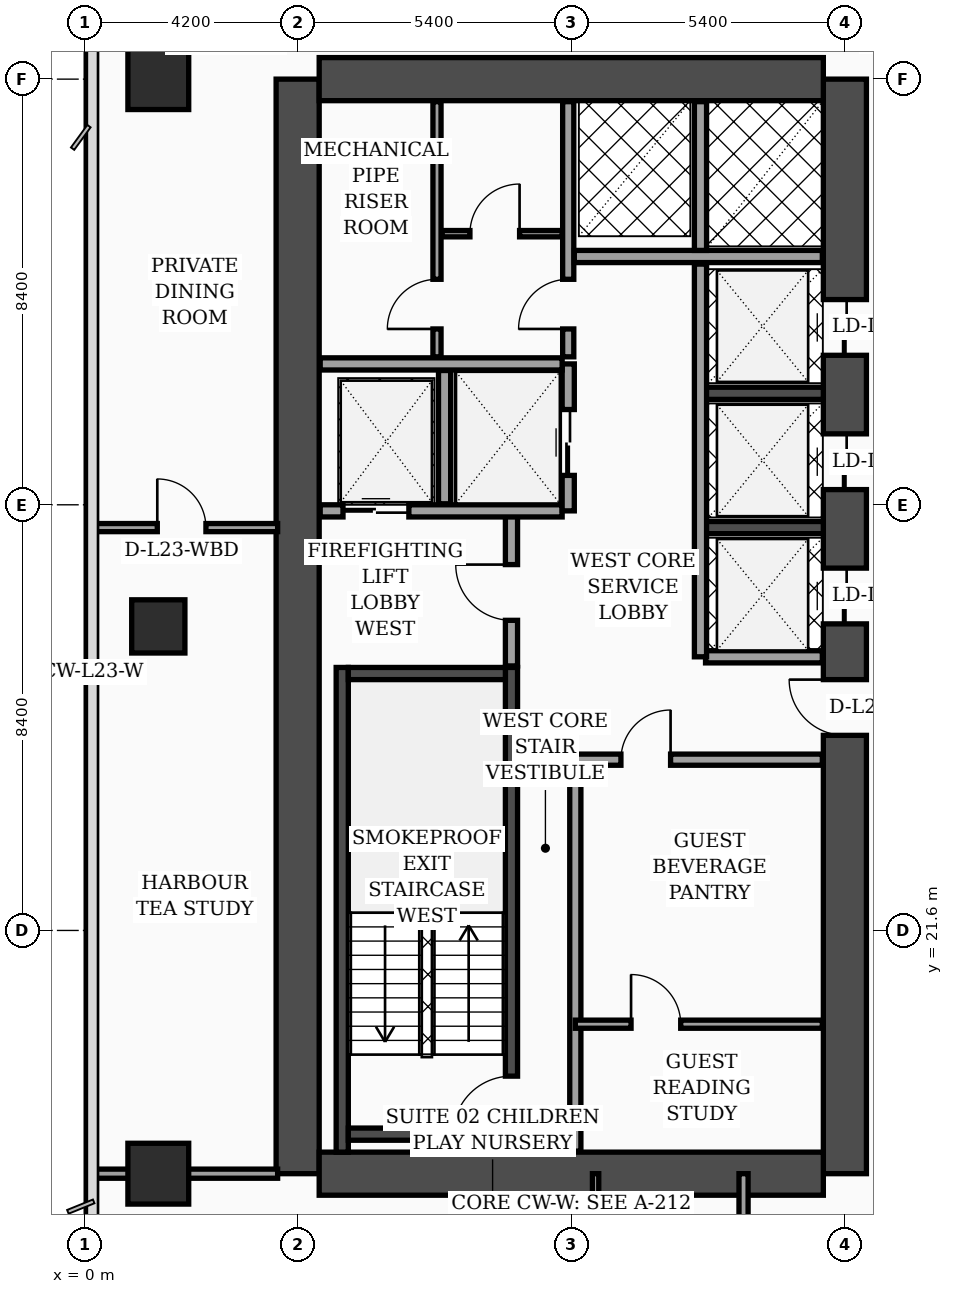
"""IFC4 building model, lengths in metres.
Left out: names, types, materials, properties, quantities, classifications, styles, units other than length and angle.
Written with IfcOpenShell. Run it as: python <this file> out.ifc"""

import sys

from ifc_helpers import new_model, si_unit, direction, frame, frame_2d, origin, origin_2d, place, context, subcontext, project, spatial, rectangle, extrude, element, fill, save


model = new_model("IFC4")
c1 = context("Model", 3, precision=1e-05, world=origin(), true_north=direction((0.0, 1.0)))
c2 = subcontext(c1, "Body", "Model", "MODEL_VIEW")
j1 = project(units=[si_unit("LENGTHUNIT", "METRE"), si_unit("PLANEANGLEUNIT", "RADIAN")], contexts=[c1])
p1 = place(None, origin())
s1 = spatial("IfcSite", under=j1, at=p1, CompositionType="ELEMENT")
p2 = place(p1, origin())
s2 = spatial("IfcBuilding", under=s1, at=p2, CompositionType="ELEMENT")
p3 = place(p2, frame((0.0, 0.0, 97.4)))
s3 = spatial("IfcBuildingStorey", under=s2, at=p3, CompositionType="ELEMENT", Elevation=97.4)
p4 = place(p3, frame((4.2, 16.8, 0.0), z_axis=(0.0, 0.0, 1.0), x_axis=(0.0, 1.0, 0.0)))
e1 = element("IfcWall", 1, at=p4, inside=s3, PredefinedType="SHEAR", context=c2, shape_type="SweptSolid", body=[
    extrude(rectangle(XDim=21.6, YDim=0.85, at=frame_2d((10.8, 0.0))), origin(), (0.0, 0.0, 1.0), 3.56),
])
p5 = place(p3, frame((15.0, 16.8, 0.0), z_axis=(0.0, 0.0, 1.0), x_axis=(0.0, 1.0, 0.0)))
e2 = element("IfcWall", 2, at=p5, inside=s3, PredefinedType="SHEAR", context=c2, shape_type="SweptSolid", body=[
    extrude(rectangle(XDim=21.6, YDim=0.85, at=frame_2d((10.8, 0.0))), origin(), (0.0, 0.0, 1.0), 3.56),
])
p6 = place(p5, frame((8.65, 0.0, 0.0)))
e3 = element("IfcOpeningElement", 3, at=p6, cuts=e2, PredefinedType="OPENING", context=c2, shape_type="SweptSolid", body=[
    extrude(rectangle(XDim=1.1, YDim=2.2, at=frame_2d((0.55, 1.1))), frame((0.0, 0.435, 0.0), z_axis=(0.0, -1.0, 0.0), x_axis=(1.0, 0.0, 0.0)), (0.0, 0.0, 1.0), 0.87),
])
p7 = place(p5, frame((10.85, 0.0, 0.0)))
e4 = element("IfcOpeningElement", 4, at=p7, cuts=e2, PredefinedType="OPENING", context=c2, shape_type="SweptSolid", body=[
    extrude(rectangle(XDim=1.1, YDim=2.2, at=frame_2d((0.55, 1.1))), frame((0.0, 0.435, 0.0), z_axis=(0.0, -1.0, 0.0), x_axis=(1.0, 0.0, 0.0)), (0.0, 0.0, 1.0), 0.87),
])
p8 = place(p5, frame((13.5, 0.0, 0.0)))
e5 = element("IfcOpeningElement", 5, at=p8, cuts=e2, PredefinedType="OPENING", context=c2, shape_type="SweptSolid", body=[
    extrude(rectangle(XDim=1.1, YDim=2.2, at=frame_2d((0.55, 1.1))), frame((0.0, 0.435, 0.0), z_axis=(0.0, -1.0, 0.0), x_axis=(1.0, 0.0, 0.0)), (0.0, 0.0, 1.0), 0.87),
])
p9 = place(p5, frame((16.15, 0.0, 0.0)))
e6 = element("IfcOpeningElement", 6, at=p9, cuts=e2, PredefinedType="OPENING", context=c2, shape_type="SweptSolid", body=[
    extrude(rectangle(XDim=1.1, YDim=2.2, at=frame_2d((0.55, 1.1))), frame((0.0, 0.435, 0.0), z_axis=(0.0, -1.0, 0.0), x_axis=(1.0, 0.0, 0.0)), (0.0, 0.0, 1.0), 0.87),
])
for number, where, z_axis, x_axis in (
    (7, (4.625, 38.4, 0.0), (0.0, 0.0, 1.0), (1.0, 0.0, 0.0)),
    (8, (4.625, 16.8, 0.0), (0.0, 0.0, 1.0), (1.0, 0.0, 0.0)),
):
    element("IfcWall", number, at=place(p3, frame(where, z_axis=z_axis, x_axis=x_axis)), inside=s3, PredefinedType="SHEAR", context=c2, shape_type="SweptSolid", body=[
        extrude(rectangle(XDim=9.95, YDim=0.85, at=frame_2d((4.975, 0.0))), origin(), (0.0, 0.0, 1.0), 3.56),
    ])
p10 = place(p3, frame((5.08, 17.225, 0.0), z_axis=(0.0, 0.0, 1.0), x_axis=(0.0, 1.0, 0.0)))
e9 = element("IfcWall", 9, at=p10, inside=s3, PredefinedType="SOLIDWALL", context=c2, shape_type="SweptSolid", body=[
    extrude(rectangle(XDim=9.565, YDim=0.24, at=frame_2d((4.782, 0.0))), origin(), (0.0, 0.0, 1.0), 3.56),
])
p11 = place(p3, frame((8.42, 17.225, 0.0), z_axis=(0.0, 0.0, 1.0), x_axis=(0.0, 1.0, 0.0)))
e10 = element("IfcWall", 10, at=p11, inside=s3, PredefinedType="SOLIDWALL", context=c2, shape_type="SweptSolid", body=[
    extrude(rectangle(XDim=9.565, YDim=0.24, at=frame_2d((4.782, 0.0))), origin(), (0.0, 0.0, 1.0), 3.56),
])
p12 = place(p11, frame((0.35, 0.0, 0.0)))
e11 = element("IfcOpeningElement", 11, at=p12, cuts=e10, PredefinedType="OPENING", context=c2, shape_type="SweptSolid", body=[
    extrude(rectangle(XDim=1.15, YDim=2.2, at=frame_2d((0.575, 1.1))), frame((0.0, 0.13, 0.0), z_axis=(0.0, -1.0, 0.0), x_axis=(1.0, 0.0, 0.0)), (0.0, 0.0, 1.0), 0.26),
])
for number, where, z_axis, x_axis in (
    (12, (5.2, 17.58, 0.0), (0.0, 0.0, 1.0), (1.0, 0.0, 0.0)),
    (13, (5.2, 26.67, 0.0), (0.0, 0.0, 1.0), (1.0, 0.0, 0.0)),
):
    element("IfcWall", number, at=place(p3, frame(where, z_axis=z_axis, x_axis=x_axis)), inside=s3, PredefinedType="SOLIDWALL", context=c2, shape_type="SweptSolid", body=[
        extrude(rectangle(XDim=3.1, YDim=0.24, at=frame_2d((1.55, 0.0))), origin(), (0.0, 0.0, 1.0), 3.56),
    ])
for number, where, z_axis, x_axis in (
    (14, (12.18, 29.55, 0.0), (0.0, 0.0, 1.0), (1.0, 0.0, 0.0)),
    (15, (12.18, 32.2, 0.0), (0.0, 0.0, 1.0), (1.0, 0.0, 0.0)),
):
    element("IfcWall", number, at=place(p3, frame(where, z_axis=z_axis, x_axis=x_axis)), inside=s3, PredefinedType="SOLIDWALL", context=c2, shape_type="SweptSolid", body=[
        extrude(rectangle(XDim=2.395, YDim=0.24, at=frame_2d((1.198, 0.0))), origin(), (0.0, 0.0, 1.0), 3.56),
    ])
p13 = place(p3, frame((1.45, 16.8, 0.0), z_axis=(0.0, 0.0, 1.0), x_axis=(1.0, 0.0, 0.0)))
e16 = element("IfcColumn", 16, at=p13, inside=s3, PredefinedType="COLUMN", context=c2, shape_type="SweptSolid", body=[
    extrude(rectangle(XDim=1.2, YDim=1.2, at=origin_2d()), origin(), (0.0, 0.0, 1.0), 3.56),
])
p14 = place(p3, frame((1.45, 27.6, 0.0), z_axis=(0.0, 0.0, 1.0), x_axis=(1.0, 0.0, 0.0)))
e17 = element("IfcColumn", 17, at=p14, inside=s3, PredefinedType="COLUMN", context=c2, shape_type="SweptSolid", body=[
    extrude(rectangle(XDim=1.05, YDim=1.05, at=origin_2d()), origin(), (0.0, 0.0, 1.0), 3.56),
])
p15 = place(p3, frame((1.45, 38.4, 0.0), z_axis=(0.0, 0.0, 1.0), x_axis=(1.0, 0.0, 0.0)))
e18 = element("IfcColumn", 18, at=p15, inside=s3, PredefinedType="COLUMN", context=c2, shape_type="SweptSolid", body=[
    extrude(rectangle(XDim=1.2, YDim=1.2, at=origin_2d()), origin(), (0.0, 0.0, 1.0), 3.56),
])
p16 = place(p3, frame((8.42, 26.82, 0.0), z_axis=(0.0, 0.0, 1.0), x_axis=(0.0, 1.0, 0.0)))
e19 = element("IfcWall", 19, at=p16, inside=s3, PredefinedType="SOLIDWALL", context=c2, shape_type="SweptSolid", body=[
    extrude(rectangle(XDim=3.0, YDim=0.24, at=frame_2d((1.5, 0.0))), origin(), (0.0, 0.0, 1.0), 3.56),
])
p17 = place(p16, frame((0.9, 0.0, 0.0)))
e20 = element("IfcOpeningElement", 20, at=p17, cuts=e19, PredefinedType="OPENING", context=c2, shape_type="SweptSolid", body=[
    extrude(rectangle(XDim=1.1, YDim=2.2, at=frame_2d((0.55, 1.1))), frame((0.0, 0.13, 0.0), z_axis=(0.0, -1.0, 0.0), x_axis=(1.0, 0.0, 0.0)), (0.0, 0.0, 1.0), 0.26),
])
p18 = place(p3, frame((4.645, 29.88, 0.0), z_axis=(0.0, 0.0, 1.0), x_axis=(1.0, 0.0, 0.0)))
e21 = element("IfcWall", 21, at=p18, inside=s3, PredefinedType="SOLIDWALL", context=c2, shape_type="SweptSolid", body=[
    extrude(rectangle(XDim=4.775, YDim=0.24, at=frame_2d((2.387, 0.0))), origin(), (0.0, 0.0, 1.0), 3.56),
])
p19 = place(p18, frame((0.45, 0.0, 0.0)))
e22 = element("IfcOpeningElement", 22, at=p19, cuts=e21, PredefinedType="OPENING", context=c2, shape_type="SweptSolid", body=[
    extrude(rectangle(XDim=1.3, YDim=2.35, at=frame_2d((0.65, 1.175))), frame((0.0, 0.13, 0.0), z_axis=(0.0, -1.0, 0.0), x_axis=(1.0, 0.0, 0.0)), (0.0, 0.0, 1.0), 0.26),
])
p20 = place(p3, frame((7.1, 30.02, 0.0), z_axis=(0.0, 0.0, 1.0), x_axis=(0.0, 1.0, 0.0)))
e23 = element("IfcWall", 23, at=p20, inside=s3, PredefinedType="SOLIDWALL", context=c2, shape_type="SweptSolid", body=[
    extrude(rectangle(XDim=2.63, YDim=0.24, at=frame_2d((1.315, 0.0))), origin(), (0.0, 0.0, 1.0), 3.56),
])
p21 = place(p3, frame((9.54, 29.88, 0.0), z_axis=(0.0, 0.0, 1.0), x_axis=(0.0, 1.0, 0.0)))
e24 = element("IfcWall", 24, at=p21, inside=s3, PredefinedType="SOLIDWALL", context=c2, shape_type="SweptSolid", body=[
    extrude(rectangle(XDim=2.9, YDim=0.24, at=frame_2d((1.45, 0.0))), origin(), (0.0, 0.0, 1.0), 3.56),
])
p22 = place(p21, frame((0.7, 0.0, 0.0)))
e25 = element("IfcOpeningElement", 25, at=p22, cuts=e24, PredefinedType="OPENING", context=c2, shape_type="SweptSolid", body=[
    extrude(rectangle(XDim=1.3, YDim=2.35, at=frame_2d((0.65, 1.175))), frame((0.0, 0.13, 0.0), z_axis=(0.0, -1.0, 0.0), x_axis=(1.0, 0.0, 0.0)), (0.0, 0.0, 1.0), 0.26),
])
p23 = place(p3, frame((4.645, 32.78, 0.0), z_axis=(0.0, 0.0, 1.0), x_axis=(1.0, 0.0, 0.0)))
e26 = element("IfcWall", 26, at=p23, inside=s3, PredefinedType="SOLIDWALL", context=c2, shape_type="SweptSolid", body=[
    extrude(rectangle(XDim=4.775, YDim=0.24, at=frame_2d((2.387, 0.0))), origin(), (0.0, 0.0, 1.0), 3.19),
])
p24 = place(p3, frame((9.68, 17.245, 0.0), z_axis=(0.0, 0.0, 1.0), x_axis=(0.0, 1.0, 0.0)))
e27 = element("IfcWall", 27, at=p24, inside=s3, PredefinedType="SOLIDWALL", context=c2, shape_type="SweptSolid", body=[
    extrude(rectangle(XDim=7.755, YDim=0.22, at=frame_2d((3.877, 0.0))), origin(), (0.0, 0.0, 1.0), 3.56),
])
p25 = place(p3, frame((6.95, 32.92, 0.0), z_axis=(0.0, 0.0, 1.0), x_axis=(0.0, 1.0, 0.0)))
e28 = element("IfcWall", 28, at=p25, inside=s3, PredefinedType="PARTITIONING", context=c2, shape_type="SweptSolid", body=[
    extrude(rectangle(XDim=5.035, YDim=0.16, at=frame_2d((2.518, 0.0))), origin(), (0.0, 0.0, 1.0), 3.56),
])
p26 = place(p25, frame((0.55, 0.0, 0.0)))
e29 = element("IfcOpeningElement", 29, at=p26, cuts=e28, PredefinedType="OPENING", context=c2, shape_type="SweptSolid", body=[
    extrude(rectangle(XDim=0.98, YDim=2.15, at=frame_2d((0.49, 1.075))), frame((0.0, 0.09, 0.0), z_axis=(0.0, -1.0, 0.0), x_axis=(1.0, 0.0, 0.0)), (0.0, 0.0, 1.0), 0.18),
])
p27 = place(p3, frame((7.05, 35.35, 0.0), z_axis=(0.0, 0.0, 1.0), x_axis=(1.0, 0.0, 0.0)))
e30 = element("IfcWall", 30, at=p27, inside=s3, PredefinedType="PARTITIONING", context=c2, shape_type="SweptSolid", body=[
    extrude(rectangle(XDim=2.37, YDim=0.125, at=frame_2d((1.185, 0.0))), origin(), (0.0, 0.0, 1.0), 3.56),
])
p28 = place(p27, frame((0.55, 0.0, 0.0)))
e31 = element("IfcOpeningElement", 31, at=p28, cuts=e30, PredefinedType="OPENING", context=c2, shape_type="SweptSolid", body=[
    extrude(rectangle(XDim=0.98, YDim=2.15, at=frame_2d((0.49, 1.075))), frame((0.0, 0.073, 0.0), z_axis=(0.0, -1.0, 0.0), x_axis=(1.0, 0.0, 0.0)), (0.0, 0.0, 1.0), 0.145),
])
p29 = place(p3, frame((9.54, 32.92, 0.0), z_axis=(0.0, 0.0, 1.0), x_axis=(0.0, 1.0, 0.0)))
e32 = element("IfcWall", 32, at=p29, inside=s3, PredefinedType="SOLIDWALL", context=c2, shape_type="SweptSolid", body=[
    extrude(rectangle(XDim=5.035, YDim=0.22, at=frame_2d((2.518, 0.0))), origin(), (0.0, 0.0, 1.0), 3.56),
])
p30 = place(p29, frame((0.55, 0.0, 0.0)))
e33 = element("IfcOpeningElement", 33, at=p30, cuts=e32, PredefinedType="OPENING", context=c2, shape_type="SweptSolid", body=[
    extrude(rectangle(XDim=0.98, YDim=2.15, at=frame_2d((0.49, 1.075))), frame((0.0, 0.12, 0.0), z_axis=(0.0, -1.0, 0.0), x_axis=(1.0, 0.0, 0.0)), (0.0, 0.0, 1.0), 0.24),
])
p31 = place(p3, frame((9.68, 19.75, 0.0), z_axis=(0.0, 0.0, 1.0), x_axis=(1.0, 0.0, 0.0)))
e34 = element("IfcWall", 34, at=p31, inside=s3, PredefinedType="PARTITIONING", context=c2, shape_type="SweptSolid", body=[
    extrude(rectangle(XDim=4.875, YDim=0.16, at=frame_2d((2.438, 0.0))), origin(), (0.0, 0.0, 1.0), 3.56),
])
p32 = place(p31, frame((1.1, 0.0, 0.0)))
e35 = element("IfcOpeningElement", 35, at=p32, cuts=e34, PredefinedType="OPENING", context=c2, shape_type="SweptSolid", body=[
    extrude(rectangle(XDim=0.98, YDim=2.15, at=frame_2d((0.49, 1.075))), frame((0.0, 0.09, 0.0), z_axis=(0.0, -1.0, 0.0), x_axis=(1.0, 0.0, 0.0)), (0.0, 0.0, 1.0), 0.18),
])
p33 = place(p3, frame((9.68, 24.97, 0.0), z_axis=(0.0, 0.0, 1.0), x_axis=(1.0, 0.0, 0.0)))
e36 = element("IfcWall", 36, at=p33, inside=s3, PredefinedType="SOLIDWALL", context=c2, shape_type="SweptSolid", body=[
    extrude(rectangle(XDim=4.875, YDim=0.22, at=frame_2d((2.438, 0.0))), origin(), (0.0, 0.0, 1.0), 2.84),
])
p34 = place(p33, frame((0.9, 0.0, 0.0)))
e37 = element("IfcOpeningElement", 37, at=p34, cuts=e36, PredefinedType="OPENING", context=c2, shape_type="SweptSolid", body=[
    extrude(rectangle(XDim=0.98, YDim=2.15, at=frame_2d((0.49, 1.075))), frame((0.0, 0.12, 0.0), z_axis=(0.0, -1.0, 0.0), x_axis=(1.0, 0.0, 0.0)), (0.0, 0.0, 1.0), 0.24),
])
p35 = place(p3, frame((12.25, 27.0, 0.0), z_axis=(0.0, 0.0, 1.0), x_axis=(1.0, 0.0, 0.0)))
e38 = element("IfcWall", 38, at=p35, inside=s3, PredefinedType="SOLIDWALL", context=c2, shape_type="SweptSolid", body=[
    extrude(rectangle(XDim=2.305, YDim=0.24, at=frame_2d((1.152, 0.0))), origin(), (0.0, 0.0, 1.0), 3.56),
])
p36 = place(p3, frame((12.15, 27.0, 0.0), z_axis=(0.0, 0.0, 1.0), x_axis=(0.0, 1.0, 0.0)))
e39 = element("IfcWall", 39, at=p36, inside=s3, PredefinedType="SOLIDWALL", context=c2, shape_type="SweptSolid", body=[
    extrude(rectangle(XDim=7.75, YDim=0.24, at=frame_2d((3.875, 0.0))), origin(), (0.0, 0.0, 1.0), 3.56),
])
p37 = place(p3, frame((9.66, 34.9, 0.0), z_axis=(0.0, 0.0, 1.0), x_axis=(1.0, 0.0, 0.0)))
e40 = element("IfcWall", 40, at=p37, inside=s3, PredefinedType="SOLIDWALL", context=c2, shape_type="SweptSolid", body=[
    extrude(rectangle(XDim=4.895, YDim=0.24, at=frame_2d((2.448, 0.0))), origin(), (0.0, 0.0, 1.0), 3.56),
])
p38 = place(p3, frame((12.15, 35.02, 0.0), z_axis=(0.0, 0.0, 1.0), x_axis=(0.0, 1.0, 0.0)))
e41 = element("IfcWall", 41, at=p38, inside=s3, PredefinedType="SOLIDWALL", context=c2, shape_type="SweptSolid", body=[
    extrude(rectangle(XDim=2.935, YDim=0.24, at=frame_2d((1.468, 0.0))), origin(), (0.0, 0.0, 1.0), 3.56),
])
p39 = place(p3, frame((0.08, 29.55, 0.0), z_axis=(0.0, 0.0, 1.0), x_axis=(1.0, 0.0, 0.0)))
e42 = element("IfcWall", 42, at=p39, inside=s3, PredefinedType="PARTITIONING", context=c2, shape_type="SweptSolid", body=[
    extrude(rectangle(XDim=3.725, YDim=0.16, at=frame_2d((1.862, 0.0))), origin(), (0.0, 0.0, 1.0), 3.04),
])
p40 = place(p39, frame((1.35, 0.0, 0.0)))
e43 = element("IfcOpeningElement", 43, at=p40, cuts=e42, PredefinedType="OPENING", context=c2, shape_type="SweptSolid", body=[
    extrude(rectangle(XDim=0.96, YDim=2.2, at=frame_2d((0.48, 1.1))), frame((0.0, 0.09, 0.0), z_axis=(0.0, -1.0, 0.0), x_axis=(1.0, 0.0, 0.0)), (0.0, 0.0, 1.0), 0.18),
])
p41 = place(p3, frame((0.08, 16.8, 0.0), z_axis=(0.0, 0.0, 1.0), x_axis=(1.0, 0.0, 0.0)))
e44 = element("IfcWall", 44, at=p41, inside=s3, PredefinedType="PARTITIONING", context=c2, shape_type="SweptSolid", body=[
    extrude(rectangle(XDim=3.725, YDim=0.18, at=frame_2d((1.862, 0.0))), origin(), (0.0, 0.0, 1.0), 2.84),
])
p42 = place(p3, frame((10.08, 14.75, 0.0), z_axis=(0.0, 0.0, 1.0), x_axis=(0.0, 1.0, 0.0)))
e45 = element("IfcWall", 45, at=p42, inside=s3, PredefinedType="PARTITIONING", context=c2, shape_type="SweptSolid", body=[
    extrude(rectangle(XDim=2.05, YDim=0.125, at=frame_2d((1.025, 0.0))), origin(), (0.0, 0.0, 1.0), 3.56),
])
p43 = place(p3, frame((13.0, 2.44, 0.0), z_axis=(0.0, 0.0, 1.0), x_axis=(0.0, 1.0, 0.0)))
e46 = element("IfcWall", 46, at=p43, inside=s3, PredefinedType="PARTITIONING", context=c2, shape_type="SweptSolid", body=[
    extrude(rectangle(XDim=14.36, YDim=0.18, at=frame_2d((7.18, 0.0))), origin(), (0.0, 0.0, 1.0), 2.84),
])
p44 = place(p43, frame((3.01, 0.0, 0.0)))
e47 = element("IfcOpeningElement", 47, at=p44, cuts=e46, PredefinedType="OPENING", context=c2, shape_type="SweptSolid", body=[
    extrude(rectangle(XDim=1.02, YDim=2.2, at=frame_2d((0.51, 1.1))), frame((0.0, 0.1, 0.0), z_axis=(0.0, -1.0, 0.0), x_axis=(1.0, 0.0, 0.0)), (0.0, 0.0, 1.0), 0.2),
])
p45 = place(p43, frame((9.18, 0.0, 0.0)))
e48 = element("IfcOpeningElement", 48, at=p45, cuts=e46, PredefinedType="OPENING", context=c2, shape_type="SweptSolid", body=[
    extrude(rectangle(XDim=1.02, YDim=2.2, at=frame_2d((0.51, 1.1))), frame((0.0, 0.1, 0.0), z_axis=(0.0, -1.0, 0.0), x_axis=(1.0, 0.0, 0.0)), (0.0, 0.0, 1.0), 0.2),
])
p46 = place(p17, origin())
e49 = element("IfcDoor", 49, at=p46, inside=s3, OperationType="SINGLE_SWING_RIGHT", PredefinedType="DOOR", context=c2, shape_type="SweptSolid", body=[
    extrude(rectangle(XDim=1.1, YDim=2.2, at=frame_2d((0.55, 1.1))), frame((0.0, 0.025, 0.0), z_axis=(0.0, -1.0, 0.0), x_axis=(1.0, 0.0, 0.0)), (0.0, 0.0, 1.0), 0.05),
])
fill(e20, e49)
p47 = place(p19, origin())
e50 = element("IfcDoor", 50, at=p47, inside=s3, OperationType="DOUBLE_DOOR_SLIDING", PredefinedType="DOOR", context=c2, shape_type="SweptSolid", body=[
    extrude(rectangle(XDim=1.3, YDim=2.35, at=frame_2d((0.65, 1.175))), frame((0.0, 0.025, 0.0), z_axis=(0.0, -1.0, 0.0), x_axis=(1.0, 0.0, 0.0)), (0.0, 0.0, 1.0), 0.05),
])
fill(e22, e50)
p48 = place(p22, origin())
e51 = element("IfcDoor", 51, at=p48, inside=s3, OperationType="DOUBLE_DOOR_SLIDING", PredefinedType="DOOR", context=c2, shape_type="SweptSolid", body=[
    extrude(rectangle(XDim=1.3, YDim=2.35, at=frame_2d((0.65, 1.175))), frame((0.0, 0.025, 0.0), z_axis=(0.0, -1.0, 0.0), x_axis=(1.0, 0.0, 0.0)), (0.0, 0.0, 1.0), 0.05),
])
fill(e25, e51)
p49 = place(p26, origin())
e52 = element("IfcDoor", 52, at=p49, inside=s3, OperationType="SINGLE_SWING_LEFT", PredefinedType="DOOR", context=c2, shape_type="SweptSolid", body=[
    extrude(rectangle(XDim=0.98, YDim=2.15, at=frame_2d((0.49, 1.075))), frame((0.0, 0.025, 0.0), z_axis=(0.0, -1.0, 0.0), x_axis=(1.0, 0.0, 0.0)), (0.0, 0.0, 1.0), 0.05),
])
fill(e29, e52)
p50 = place(p28, origin())
e53 = element("IfcDoor", 53, at=p50, inside=s3, OperationType="SINGLE_SWING_RIGHT", PredefinedType="DOOR", context=c2, shape_type="SweptSolid", body=[
    extrude(rectangle(XDim=0.98, YDim=2.15, at=frame_2d((0.49, 1.075))), frame((0.0, 0.025, 0.0), z_axis=(0.0, -1.0, 0.0), x_axis=(1.0, 0.0, 0.0)), (0.0, 0.0, 1.0), 0.05),
])
fill(e31, e53)
p51 = place(p30, origin())
e54 = element("IfcDoor", 54, at=p51, inside=s3, OperationType="SINGLE_SWING_LEFT", PredefinedType="DOOR", context=c2, shape_type="SweptSolid", body=[
    extrude(rectangle(XDim=0.98, YDim=2.15, at=frame_2d((0.49, 1.075))), frame((0.0, 0.025, 0.0), z_axis=(0.0, -1.0, 0.0), x_axis=(1.0, 0.0, 0.0)), (0.0, 0.0, 1.0), 0.05),
])
fill(e33, e54)
p52 = place(p32, origin())
e55 = element("IfcDoor", 55, at=p52, inside=s3, OperationType="SINGLE_SWING_LEFT", PredefinedType="DOOR", context=c2, shape_type="SweptSolid", body=[
    extrude(rectangle(XDim=0.98, YDim=2.15, at=frame_2d((0.49, 1.075))), frame((0.0, 0.025, 0.0), z_axis=(0.0, -1.0, 0.0), x_axis=(1.0, 0.0, 0.0)), (0.0, 0.0, 1.0), 0.05),
])
fill(e35, e55)
p53 = place(p34, origin())
e56 = element("IfcDoor", 56, at=p53, inside=s3, OperationType="SINGLE_SWING_RIGHT", PredefinedType="DOOR", context=c2, shape_type="SweptSolid", body=[
    extrude(rectangle(XDim=0.98, YDim=2.15, at=frame_2d((0.49, 1.075))), frame((0.0, 0.025, 0.0), z_axis=(0.0, -1.0, 0.0), x_axis=(1.0, 0.0, 0.0)), (0.0, 0.0, 1.0), 0.05),
])
fill(e37, e56)
p54 = place(p40, origin())
e57 = element("IfcDoor", 57, at=p54, inside=s3, OperationType="SINGLE_SWING_LEFT", PredefinedType="DOOR", context=c2, shape_type="SweptSolid", body=[
    extrude(rectangle(XDim=0.96, YDim=2.2, at=frame_2d((0.48, 1.1))), frame((0.0, 0.025, 0.0), z_axis=(0.0, -1.0, 0.0), x_axis=(1.0, 0.0, 0.0)), (0.0, 0.0, 1.0), 0.05),
])
fill(e43, e57)
p55 = place(p12, origin())
e58 = element("IfcDoor", 58, at=p55, inside=s3, OperationType="SINGLE_SWING_LEFT", PredefinedType="DOOR", context=c2, shape_type="SweptSolid", body=[
    extrude(rectangle(XDim=1.15, YDim=2.2, at=frame_2d((0.575, 1.1))), frame((0.0, 0.025, 0.0), z_axis=(0.0, -1.0, 0.0), x_axis=(1.0, 0.0, 0.0)), (0.0, 0.0, 1.0), 0.05),
])
fill(e11, e58)
p56 = place(p6, origin())
e59 = element("IfcDoor", 59, at=p56, inside=s3, OperationType="SINGLE_SWING_RIGHT", PredefinedType="DOOR", context=c2, shape_type="SweptSolid", body=[
    extrude(rectangle(XDim=1.1, YDim=2.2, at=frame_2d((0.55, 1.1))), frame((0.0, 0.025, 0.0), z_axis=(0.0, -1.0, 0.0), x_axis=(1.0, 0.0, 0.0)), (0.0, 0.0, 1.0), 0.05),
])
fill(e3, e59)
p57 = place(p7, origin())
e60 = element("IfcDoor", 60, at=p57, inside=s3, OperationType="DOUBLE_DOOR_SLIDING", PredefinedType="DOOR", context=c2, shape_type="SweptSolid", body=[
    extrude(rectangle(XDim=1.1, YDim=2.2, at=frame_2d((0.55, 1.1))), frame((0.0, 0.025, 0.0), z_axis=(0.0, -1.0, 0.0), x_axis=(1.0, 0.0, 0.0)), (0.0, 0.0, 1.0), 0.05),
])
fill(e4, e60)
p58 = place(p8, origin())
e61 = element("IfcDoor", 61, at=p58, inside=s3, OperationType="DOUBLE_DOOR_SLIDING", PredefinedType="DOOR", context=c2, shape_type="SweptSolid", body=[
    extrude(rectangle(XDim=1.1, YDim=2.2, at=frame_2d((0.55, 1.1))), frame((0.0, 0.025, 0.0), z_axis=(0.0, -1.0, 0.0), x_axis=(1.0, 0.0, 0.0)), (0.0, 0.0, 1.0), 0.05),
])
fill(e5, e61)
p59 = place(p9, origin())
e62 = element("IfcDoor", 62, at=p59, inside=s3, OperationType="DOUBLE_DOOR_SLIDING", PredefinedType="DOOR", context=c2, shape_type="SweptSolid", body=[
    extrude(rectangle(XDim=1.1, YDim=2.2, at=frame_2d((0.55, 1.1))), frame((0.0, 0.025, 0.0), z_axis=(0.0, -1.0, 0.0), x_axis=(1.0, 0.0, 0.0)), (0.0, 0.0, 1.0), 0.05),
])
fill(e6, e62)
save(model, sys.argv[1])
